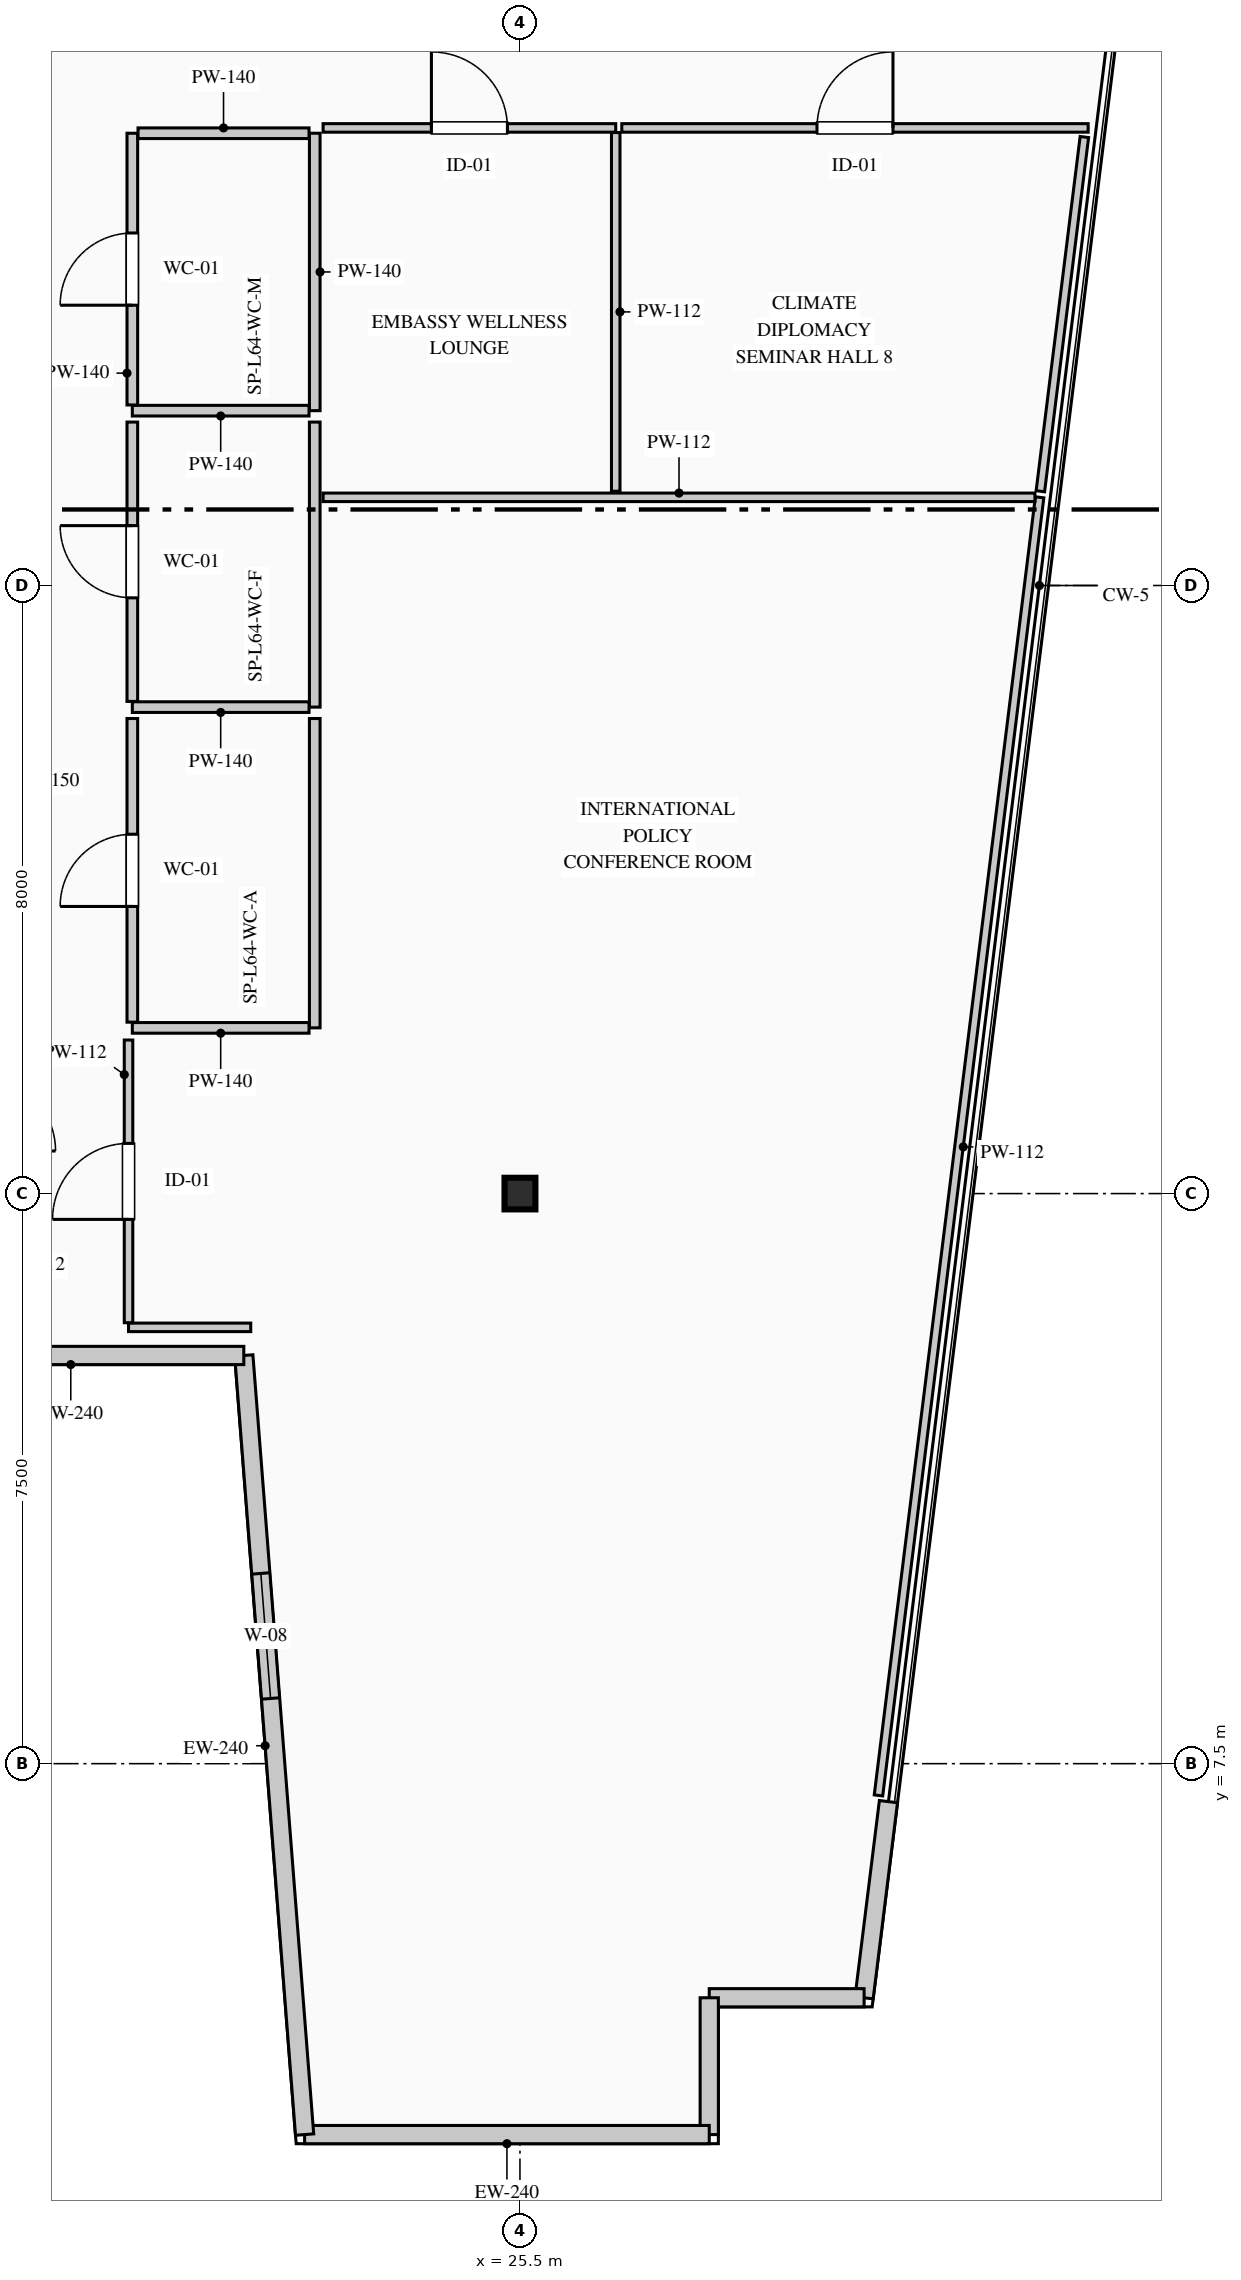
"""IFC4 building model, lengths in metres.
Left out: names, types, materials, properties, quantities, classifications, styles, units other than length and angle.
Written with IfcOpenShell. Run it as: python <this file> out.ifc"""

import sys

from ifc_helpers import new_model, si_unit, direction, frame, frame_2d, origin, origin_2d, place, context, subcontext, project, spatial, rectangle, i_section, extrude, element, fill, save


model = new_model("IFC4")
c1 = context("Model", 3, precision=1e-05, world=origin(), true_north=direction((0.0, 1.0)))
c2 = subcontext(c1, "Body", "Model", "MODEL_VIEW")
j1 = project(units=[si_unit("LENGTHUNIT", "METRE"), si_unit("PLANEANGLEUNIT", "RADIAN")], contexts=[c1])
p1 = place(None, origin())
s1 = spatial("IfcSite", under=j1, at=p1, CompositionType="ELEMENT")
p2 = place(p1, origin())
s2 = spatial("IfcBuilding", under=s1, at=p2, CompositionType="ELEMENT")
p3 = place(p2, frame((0.0, 0.0, 268.55)))
s3 = spatial("IfcBuildingStorey", under=s2, at=p3, CompositionType="ELEMENT", Elevation=268.55)
p4 = place(p3, frame((25.5, 15.0, 0.0), z_axis=(0.0, 0.0, 1.0), x_axis=(1.0, 0.0, 0.0)))
e1 = element("IfcColumn", 1, at=p4, inside=s3, PredefinedType="COLUMN", context=c2, shape_type="SweptSolid", body=[
    extrude(i_section(OverallWidth=0.406, OverallDepth=0.416, WebThickness=0.03, FlangeThickness=0.048, FilletRadius=0.015, at=origin_2d()), origin(), (0.0, 0.0, 1.0), 3.95),
])
p5 = place(p3, frame((30.348, 7.0, 0.0), z_axis=(0.0, 0.0, 1.0), x_axis=(-0.123191073593, -0.992382970121, 0.0)))
e2 = element("IfcWall", 2, at=p5, inside=s3, PredefinedType="STANDARD", context=c2, shape_type="SweptSolid", body=[
    extrude(rectangle(XDim=2.6, YDim=0.24, at=frame_2d((1.3, 0.0))), origin(), (0.0, 0.0, 1.0), 3.7),
])
p6 = place(p3, frame((30.028, 4.42, 0.0), z_axis=(0.0, 0.0, 1.0), x_axis=(-1.0, 0.0, 0.0)))
e3 = element("IfcWall", 3, at=p6, inside=s3, PredefinedType="STANDARD", context=c2, shape_type="SweptSolid", body=[
    extrude(rectangle(XDim=2.037, YDim=0.24, at=frame_2d((1.019, 0.0))), origin(), (0.0, 0.0, 1.0), 3.7),
])
p7 = place(p3, frame((27.99, 4.42, 0.0), z_axis=(0.0, 0.0, 1.0), x_axis=(0.0, -1.0, 0.0)))
e4 = element("IfcWall", 4, at=p7, inside=s3, PredefinedType="STANDARD", context=c2, shape_type="SweptSolid", body=[
    extrude(rectangle(XDim=1.8, YDim=0.24, at=frame_2d((0.9, 0.0))), origin(), (0.0, 0.0, 1.0), 3.7),
])
p8 = place(p3, frame((27.99, 2.62, 0.0), z_axis=(0.0, 0.0, 1.0), x_axis=(-1.0, 0.0, 0.0)))
e5 = element("IfcWall", 5, at=p8, inside=s3, PredefinedType="STANDARD", context=c2, shape_type="SweptSolid", body=[
    extrude(rectangle(XDim=5.324, YDim=0.24, at=frame_2d((2.662, 0.0))), origin(), (0.0, 0.0, 1.0), 3.7),
])
p9 = place(p3, frame((22.667, 2.62, 0.0), z_axis=(0.0, 0.0, 1.0), x_axis=(-0.077816860153, 0.996967670627, 0.0)))
e6 = element("IfcWall", 6, at=p9, inside=s3, PredefinedType="STANDARD", context=c2, shape_type="SweptSolid", body=[
    extrude(rectangle(XDim=10.281, YDim=0.24, at=frame_2d((5.141, 0.0))), origin(), (0.0, 0.0, 1.0), 3.7),
])
p10 = place(p9, frame((5.755, 0.0, 0.9)))
e7 = element("IfcOpeningElement", 7, at=p10, cuts=e6, PredefinedType="OPENING", context=c2, shape_type="SweptSolid", body=[
    extrude(rectangle(XDim=1.65, YDim=1.95, at=frame_2d((0.825, 0.975))), frame((0.0, 0.13, 0.0), z_axis=(0.0, -1.0, 0.0), x_axis=(1.0, 0.0, 0.0)), (0.0, 0.0, 1.0), 0.26),
])
p11 = place(p3, frame((21.867, 12.87, 0.0), z_axis=(0.0, 0.0, 1.0), x_axis=(-1.0, 0.0, 0.0)))
e8 = element("IfcWall", 8, at=p11, inside=s3, PredefinedType="STANDARD", context=c2, shape_type="SweptSolid", body=[
    extrude(rectangle(XDim=4.553, YDim=0.24, at=frame_2d((2.277, 0.0))), origin(), (0.0, 0.0, 1.0), 3.7),
])
p12 = place(p3, frame((22.8, 28.95, 0.0), z_axis=(0.0, 0.0, 1.0), x_axis=(0.0, -1.0, 0.0)))
e9 = element("IfcWall", 9, at=p12, inside=s3, PredefinedType="PARTITIONING", context=c2, shape_type="SweptSolid", body=[
    extrude(rectangle(XDim=3.65, YDim=0.14, at=frame_2d((1.825, 0.0))), origin(), (0.0, 0.0, 1.0), 3.285),
])
p13 = place(p3, frame((22.725, 25.3, 0.0), z_axis=(0.0, 0.0, 1.0), x_axis=(-1.0, 0.0, 0.0)))
e10 = element("IfcWall", 10, at=p13, inside=s3, PredefinedType="PARTITIONING", context=c2, shape_type="SweptSolid", body=[
    extrude(rectangle(XDim=2.325, YDim=0.14, at=frame_2d((1.163, 0.0))), origin(), (0.0, 0.0, 1.0), 3.7),
])
p14 = place(p3, frame((20.4, 25.375, 0.0), z_axis=(0.0, 0.0, 1.0), x_axis=(0.0, 1.0, 0.0)))
e11 = element("IfcWall", 11, at=p14, inside=s3, PredefinedType="PARTITIONING", context=c2, shape_type="SweptSolid", body=[
    extrude(rectangle(XDim=3.575, YDim=0.14, at=frame_2d((1.788, 0.0))), origin(), (0.0, 0.0, 1.0), 3.7),
])
p15 = place(p14, frame((1.312, 0.0, 0.0)))
e12 = element("IfcOpeningElement", 12, at=p15, cuts=e11, PredefinedType="OPENING", context=c2, shape_type="SweptSolid", body=[
    extrude(rectangle(XDim=0.95, YDim=2.15, at=frame_2d((0.475, 1.075))), frame((0.0, 0.08, 0.0), z_axis=(0.0, -1.0, 0.0), x_axis=(1.0, 0.0, 0.0)), (0.0, 0.0, 1.0), 0.16),
])
p16 = place(p3, frame((20.475, 28.95, 0.0), z_axis=(0.0, 0.0, 1.0), x_axis=(1.0, 0.0, 0.0)))
e13 = element("IfcWall", 13, at=p16, inside=s3, PredefinedType="PARTITIONING", context=c2, shape_type="SweptSolid", body=[
    extrude(rectangle(XDim=2.25, YDim=0.14, at=frame_2d((1.125, 0.0))), origin(), (0.0, 0.0, 1.0), 3.7),
])
p17 = place(p3, frame((22.8, 25.15, 0.0), z_axis=(0.0, 0.0, 1.0), x_axis=(0.0, -1.0, 0.0)))
e14 = element("IfcWall", 14, at=p17, inside=s3, PredefinedType="PARTITIONING", context=c2, shape_type="SweptSolid", body=[
    extrude(rectangle(XDim=3.75, YDim=0.14, at=frame_2d((1.875, 0.0))), origin(), (0.0, 0.0, 1.0), 3.285),
])
p18 = place(p3, frame((22.725, 21.4, 0.0), z_axis=(0.0, 0.0, 1.0), x_axis=(-1.0, 0.0, 0.0)))
e15 = element("IfcWall", 15, at=p18, inside=s3, PredefinedType="PARTITIONING", context=c2, shape_type="SweptSolid", body=[
    extrude(rectangle(XDim=2.325, YDim=0.14, at=frame_2d((1.163, 0.0))), origin(), (0.0, 0.0, 1.0), 3.7),
])
p19 = place(p3, frame((20.4, 21.475, 0.0), z_axis=(0.0, 0.0, 1.0), x_axis=(0.0, 1.0, 0.0)))
e16 = element("IfcWall", 16, at=p19, inside=s3, PredefinedType="PARTITIONING", context=c2, shape_type="SweptSolid", body=[
    extrude(rectangle(XDim=3.675, YDim=0.14, at=frame_2d((1.837, 0.0))), origin(), (0.0, 0.0, 1.0), 3.7),
])
p20 = place(p19, frame((1.363, 0.0, 0.0)))
e17 = element("IfcOpeningElement", 17, at=p20, cuts=e16, PredefinedType="OPENING", context=c2, shape_type="SweptSolid", body=[
    extrude(rectangle(XDim=0.95, YDim=2.15, at=frame_2d((0.475, 1.075))), frame((0.0, 0.08, 0.0), z_axis=(0.0, -1.0, 0.0), x_axis=(1.0, 0.0, 0.0)), (0.0, 0.0, 1.0), 0.16),
])
p21 = place(p3, frame((22.8, 21.25, 0.0), z_axis=(0.0, 0.0, 1.0), x_axis=(0.0, -1.0, 0.0)))
e18 = element("IfcWall", 18, at=p21, inside=s3, PredefinedType="PARTITIONING", context=c2, shape_type="SweptSolid", body=[
    extrude(rectangle(XDim=4.07, YDim=0.14, at=frame_2d((2.035, 0.0))), origin(), (0.0, 0.0, 1.0), 3.285),
])
p22 = place(p3, frame((22.725, 17.18, 0.0), z_axis=(0.0, 0.0, 1.0), x_axis=(-1.0, 0.0, 0.0)))
e19 = element("IfcWall", 19, at=p22, inside=s3, PredefinedType="PARTITIONING", context=c2, shape_type="SweptSolid", body=[
    extrude(rectangle(XDim=2.325, YDim=0.14, at=frame_2d((1.163, 0.0))), origin(), (0.0, 0.0, 1.0), 3.7),
])
p23 = place(p3, frame((20.4, 17.255, 0.0), z_axis=(0.0, 0.0, 1.0), x_axis=(0.0, 1.0, 0.0)))
e20 = element("IfcWall", 20, at=p23, inside=s3, PredefinedType="PARTITIONING", context=c2, shape_type="SweptSolid", body=[
    extrude(rectangle(XDim=3.995, YDim=0.14, at=frame_2d((1.998, 0.0))), origin(), (0.0, 0.0, 1.0), 3.7),
])
p24 = place(p23, frame((1.522, 0.0, 0.0)))
e21 = element("IfcOpeningElement", 21, at=p24, cuts=e20, PredefinedType="OPENING", context=c2, shape_type="SweptSolid", body=[
    extrude(rectangle(XDim=0.95, YDim=2.15, at=frame_2d((0.475, 1.075))), frame((0.0, 0.08, 0.0), z_axis=(0.0, -1.0, 0.0), x_axis=(1.0, 0.0, 0.0)), (0.0, 0.0, 1.0), 0.16),
])
p25 = place(p3, frame((32.337, 24.16, 0.0), z_axis=(0.0, 0.0, 1.0), x_axis=(-0.123182617282, -0.992384019823, 0.0)))
e22 = element("IfcWall", 22, at=p25, inside=s3, PredefinedType="PARTITIONING", context=c2, shape_type="SweptSolid", body=[
    extrude(rectangle(XDim=17.209, YDim=0.112, at=frame_2d((8.604, 0.0))), origin(), (0.0, 0.0, 1.0), 3.7),
])
p26 = place(p3, frame((21.958, 13.24, 0.0), z_axis=(0.0, 0.0, 1.0), x_axis=(-1.0, 0.0, 0.0)))
e23 = element("IfcWall", 23, at=p26, inside=s3, PredefinedType="PARTITIONING", context=c2, shape_type="SweptSolid", body=[
    extrude(rectangle(XDim=1.608, YDim=0.112, at=frame_2d((0.804, 0.0))), origin(), (0.0, 0.0, 1.0), 3.7),
])
p27 = place(p3, frame((20.35, 13.301, 0.0), z_axis=(0.0, 0.0, 1.0), x_axis=(0.0, 1.0, 0.0)))
e24 = element("IfcWall", 24, at=p27, inside=s3, PredefinedType="PARTITIONING", context=c2, shape_type="SweptSolid", body=[
    extrude(rectangle(XDim=3.719, YDim=0.112, at=frame_2d((1.859, 0.0))), origin(), (0.0, 0.0, 1.0), 3.7),
])
p28 = place(p27, frame((1.36, 0.0, 0.0)))
e25 = element("IfcOpeningElement", 25, at=p28, cuts=e24, PredefinedType="OPENING", context=c2, shape_type="SweptSolid", body=[
    extrude(rectangle(XDim=1.0, YDim=2.15, at=frame_2d((0.5, 1.075))), frame((0.0, 0.066, 0.0), z_axis=(0.0, -1.0, 0.0), x_axis=(1.0, 0.0, 0.0)), (0.0, 0.0, 1.0), 0.132),
])
p29 = place(p3, frame((22.91, 24.16, 0.0), z_axis=(0.0, 0.0, 1.0), x_axis=(1.0, 0.0, 0.0)))
e26 = element("IfcWall", 26, at=p29, inside=s3, PredefinedType="PARTITIONING", context=c2, shape_type="SweptSolid", body=[
    extrude(rectangle(XDim=9.365, YDim=0.112, at=frame_2d((4.683, 0.0))), origin(), (0.0, 0.0, 1.0), 3.7),
])
p30 = place(p3, frame((22.91, 29.02, 0.0), z_axis=(0.0, 0.0, 1.0), x_axis=(1.0, 0.0, 0.0)))
e27 = element("IfcWall", 27, at=p30, inside=s3, PredefinedType="PARTITIONING", context=c2, shape_type="SweptSolid", body=[
    extrude(rectangle(XDim=3.85, YDim=0.112, at=frame_2d((1.925, 0.0))), origin(), (0.0, 0.0, 1.0), 3.7),
])
p31 = place(p30, frame((1.425, 0.0, 0.0)))
e28 = element("IfcOpeningElement", 28, at=p31, cuts=e27, PredefinedType="OPENING", context=c2, shape_type="SweptSolid", body=[
    extrude(rectangle(XDim=1.0, YDim=2.15, at=frame_2d((0.5, 1.075))), frame((0.0, 0.066, 0.0), z_axis=(0.0, -1.0, 0.0), x_axis=(1.0, 0.0, 0.0)), (0.0, 0.0, 1.0), 0.132),
])
p32 = place(p3, frame((26.76, 28.959, 0.0), z_axis=(0.0, 0.0, 1.0), x_axis=(0.0, -1.0, 0.0)))
e29 = element("IfcWall", 29, at=p32, inside=s3, PredefinedType="PARTITIONING", context=c2, shape_type="SweptSolid", body=[
    extrude(rectangle(XDim=4.719, YDim=0.112, at=frame_2d((2.359, 0.0))), origin(), (0.0, 0.0, 1.0), 3.7),
])
p33 = place(p3, frame((26.84, 29.02, 0.0), z_axis=(0.0, 0.0, 1.0), x_axis=(1.0, 0.0, 0.0)))
e30 = element("IfcWall", 30, at=p33, inside=s3, PredefinedType="PARTITIONING", context=c2, shape_type="SweptSolid", body=[
    extrude(rectangle(XDim=6.136, YDim=0.112, at=frame_2d((3.068, 0.0))), origin(), (0.0, 0.0, 1.0), 3.7),
])
p34 = place(p33, frame((2.568, 0.0, 0.0)))
e31 = element("IfcOpeningElement", 31, at=p34, cuts=e30, PredefinedType="OPENING", context=c2, shape_type="SweptSolid", body=[
    extrude(rectangle(XDim=1.0, YDim=2.15, at=frame_2d((0.5, 1.075))), frame((0.0, 0.066, 0.0), z_axis=(0.0, -1.0, 0.0), x_axis=(1.0, 0.0, 0.0)), (0.0, 0.0, 1.0), 0.132),
])
p35 = place(p3, frame((32.926, 28.9, 0.0), z_axis=(0.0, 0.0, 1.0), x_axis=(-0.123324415608, -0.992366408397, 0.0)))
e32 = element("IfcWall", 32, at=p35, inside=s3, PredefinedType="PARTITIONING", context=c2, shape_type="SweptSolid", body=[
    extrude(rectangle(XDim=4.696, YDim=0.112, at=frame_2d((2.348, 0.0))), origin(), (0.0, 0.0, 1.0), 3.7),
])
p36 = place(p10, origin())
e33 = element("IfcWindow", 33, at=p36, inside=s3, PartitioningType="SINGLE_PANEL", PredefinedType="WINDOW", context=c2, shape_type="SweptSolid", body=[
    extrude(rectangle(XDim=1.65, YDim=1.95, at=frame_2d((0.825, 0.975))), frame((0.0, 0.03, 0.0), z_axis=(0.0, -1.0, 0.0), x_axis=(1.0, 0.0, 0.0)), (0.0, 0.0, 1.0), 0.06),
])
fill(e7, e33)
p37 = place(p15, origin())
e34 = element("IfcDoor", 34, at=p37, inside=s3, OperationType="SINGLE_SWING_LEFT", PredefinedType="DOOR", context=c2, shape_type="SweptSolid", body=[
    extrude(rectangle(XDim=0.95, YDim=2.15, at=frame_2d((0.475, 1.075))), frame((0.0, 0.025, 0.0), z_axis=(0.0, -1.0, 0.0), x_axis=(1.0, 0.0, 0.0)), (0.0, 0.0, 1.0), 0.05),
])
fill(e12, e34)
p38 = place(p20, origin())
e35 = element("IfcDoor", 35, at=p38, inside=s3, OperationType="SINGLE_SWING_RIGHT", PredefinedType="DOOR", context=c2, shape_type="SweptSolid", body=[
    extrude(rectangle(XDim=0.95, YDim=2.15, at=frame_2d((0.475, 1.075))), frame((0.0, 0.025, 0.0), z_axis=(0.0, -1.0, 0.0), x_axis=(1.0, 0.0, 0.0)), (0.0, 0.0, 1.0), 0.05),
])
fill(e17, e35)
p39 = place(p24, origin())
e36 = element("IfcDoor", 36, at=p39, inside=s3, OperationType="SINGLE_SWING_LEFT", PredefinedType="DOOR", context=c2, shape_type="SweptSolid", body=[
    extrude(rectangle(XDim=0.95, YDim=2.15, at=frame_2d((0.475, 1.075))), frame((0.0, 0.025, 0.0), z_axis=(0.0, -1.0, 0.0), x_axis=(1.0, 0.0, 0.0)), (0.0, 0.0, 1.0), 0.05),
])
fill(e21, e36)
p40 = place(p28, origin())
e37 = element("IfcDoor", 37, at=p40, inside=s3, OperationType="SINGLE_SWING_LEFT", PredefinedType="DOOR", context=c2, shape_type="SweptSolid", body=[
    extrude(rectangle(XDim=1.0, YDim=2.15, at=frame_2d((0.5, 1.075))), frame((0.0, 0.025, 0.0), z_axis=(0.0, -1.0, 0.0), x_axis=(1.0, 0.0, 0.0)), (0.0, 0.0, 1.0), 0.05),
])
fill(e25, e37)
p41 = place(p31, origin())
e38 = element("IfcDoor", 38, at=p41, inside=s3, OperationType="SINGLE_SWING_LEFT", PredefinedType="DOOR", context=c2, shape_type="SweptSolid", body=[
    extrude(rectangle(XDim=1.0, YDim=2.15, at=frame_2d((0.5, 1.075))), frame((0.0, 0.025, 0.0), z_axis=(0.0, -1.0, 0.0), x_axis=(1.0, 0.0, 0.0)), (0.0, 0.0, 1.0), 0.05),
])
fill(e28, e38)
p42 = place(p34, origin())
e39 = element("IfcDoor", 39, at=p42, inside=s3, OperationType="SINGLE_SWING_RIGHT", PredefinedType="DOOR", context=c2, shape_type="SweptSolid", body=[
    extrude(rectangle(XDim=1.0, YDim=2.15, at=frame_2d((0.5, 1.075))), frame((0.0, 0.025, 0.0), z_axis=(0.0, -1.0, 0.0), x_axis=(1.0, 0.0, 0.0)), (0.0, 0.0, 1.0), 0.05),
])
fill(e31, e39)
save(model, sys.argv[1])
